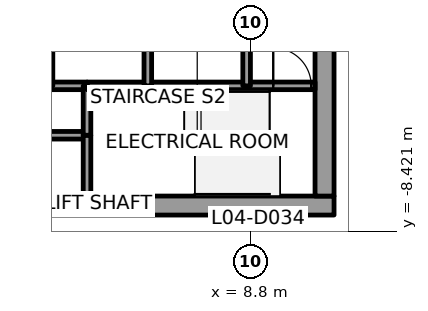
"""IFC4 building model, lengths in metres.
Left out: names, types, materials, properties, quantities, classifications, styles, units other than length and angle.
Written with IfcOpenShell. Run it as: python <this file> out.ifc"""

import sys

from ifc_helpers import new_model, si_unit, direction, frame, frame_2d, origin, place, context, subcontext, project, spatial, rectangle, extrude, element, fill, save


model = new_model("IFC4")
c1 = context("Model", 3, precision=1e-05, world=origin(), true_north=direction((0.0, 1.0)))
c2 = subcontext(c1, "Body", "Model", "MODEL_VIEW")
j1 = project(units=[si_unit("LENGTHUNIT", "METRE"), si_unit("PLANEANGLEUNIT", "RADIAN")], contexts=[c1])
p1 = place(None, origin())
s1 = spatial("IfcSite", under=j1, at=p1, CompositionType="ELEMENT")
p2 = place(p1, origin())
s2 = spatial("IfcBuilding", under=s1, at=p2, CompositionType="ELEMENT")
p3 = place(p2, frame((0.0, 0.0, 28.8)))
s3 = spatial("IfcBuildingStorey", under=s2, at=p3, CompositionType="ELEMENT", Elevation=28.8)
p4 = place(p3, frame((-11.0, -7.75, 0.0), z_axis=(0.0, 0.0, 1.0), x_axis=(1.0, 0.0, 0.0)))
e1 = element("IfcWall", 1, at=p4, inside=s3, PredefinedType="SHEAR", context=c2, shape_type="SweptSolid", body=[
    extrude(rectangle(XDim=22.0, YDim=0.5, at=frame_2d((11.0, 0.0))), origin(), (0.0, 0.0, 1.0), 5.4),
])
p5 = place(p4, frame((10.45, 0.0, 0.0)))
e2 = element("IfcOpeningElement", 2, at=p5, cuts=e1, PredefinedType="OPENING", context=c2, shape_type="SweptSolid", body=[
    extrude(rectangle(XDim=1.1, YDim=2.1, at=frame_2d((0.55, 1.05))), frame((0.0, 0.25, 0.0), z_axis=(0.0, -1.0, 0.0), x_axis=(1.0, 0.0, 0.0)), (0.0, 0.0, 1.0), 0.5),
])
p6 = place(p3, frame((10.75, -7.5, 0.0), z_axis=(0.0, 0.0, 1.0), x_axis=(0.0, 1.0, 0.0)))
e3 = element("IfcWall", 3, at=p6, inside=s3, PredefinedType="SHEAR", context=c2, shape_type="SweptSolid", body=[
    extrude(rectangle(XDim=15.0, YDim=0.5, at=frame_2d((7.5, 0.0))), origin(), (0.0, 0.0, 1.0), 5.4),
])
p7 = place(p6, frame((6.6, 0.0, 0.0)))
e4 = element("IfcOpeningElement", 4, at=p7, cuts=e3, PredefinedType="OPENING", context=c2, shape_type="SweptSolid", body=[
    extrude(rectangle(XDim=1.8, YDim=2.1, at=frame_2d((0.9, 1.05))), frame((0.0, 0.25, 0.0), z_axis=(0.0, -1.0, 0.0), x_axis=(1.0, 0.0, 0.0)), (0.0, 0.0, 1.0), 0.5),
])
p8 = place(p3, frame((4.5, -5.9, 0.0), z_axis=(0.0, 0.0, 1.0), x_axis=(-1.0, 0.0, 0.0)))
e5 = element("IfcWall", 5, at=p8, inside=s3, PredefinedType="SOLIDWALL", context=c2, shape_type="SweptSolid", body=[
    extrude(rectangle(XDim=2.5, YDim=0.2, at=frame_2d((1.25, 0.0))), origin(), (0.0, 0.0, 1.0), 5.0),
])
p9 = place(p3, frame((3.5, -4.6, 0.0), z_axis=(0.0, 0.0, 1.0), x_axis=(1.0, 0.0, 0.0)))
e6 = element("IfcWall", 6, at=p9, inside=s3, PredefinedType="SOLIDWALL", context=c2, shape_type="SweptSolid", body=[
    extrude(rectangle(XDim=1.0, YDim=0.2, at=frame_2d((0.5, 0.0))), origin(), (0.0, 0.0, 1.0), 5.0),
])
p10 = place(p3, frame((4.5, -7.5, 0.0), z_axis=(0.0, 0.0, 1.0), x_axis=(0.0, 1.0, 0.0)))
e7 = element("IfcWall", 7, at=p10, inside=s3, PredefinedType="SOLIDWALL", context=c2, shape_type="SweptSolid", body=[
    extrude(rectangle(XDim=1.6, YDim=0.2, at=frame_2d((0.8, 0.0))), origin(), (0.0, 0.0, 1.0), 5.0),
])
p11 = place(p3, frame((4.5, -5.9, 0.0), z_axis=(0.0, 0.0, 1.0), x_axis=(0.0, 1.0, 0.0)))
e8 = element("IfcWall", 8, at=p11, inside=s3, PredefinedType="SOLIDWALL", context=c2, shape_type="SweptSolid", body=[
    extrude(rectangle(XDim=1.3, YDim=0.2, at=frame_2d((0.65, 0.0))), origin(), (0.0, 0.0, 1.0), 5.0),
])
p12 = place(p3, frame((4.5, -4.6, 0.0), z_axis=(0.0, 0.0, 1.0), x_axis=(1.0, 0.0, 0.0)))
e9 = element("IfcWall", 9, at=p12, inside=s3, PredefinedType="SOLIDWALL", context=c2, shape_type="SweptSolid", body=[
    extrude(rectangle(XDim=1.6, YDim=0.2, at=frame_2d((0.8, 0.0))), origin(), (0.0, 0.0, 1.0), 5.0),
])
p13 = place(p3, frame((6.1, -4.6, 0.0), z_axis=(0.0, 0.0, 1.0), x_axis=(1.0, 0.0, 0.0)))
e10 = element("IfcWall", 10, at=p13, inside=s3, PredefinedType="SOLIDWALL", context=c2, shape_type="SweptSolid", body=[
    extrude(rectangle(XDim=2.6, YDim=0.2, at=frame_2d((1.3, 0.0))), origin(), (0.0, 0.0, 1.0), 5.0),
])
p14 = place(p3, frame((6.1, -4.6, 0.0), z_axis=(0.0, 0.0, 1.0), x_axis=(0.0, 1.0, 0.0)))
e11 = element("IfcWall", 11, at=p14, inside=s3, PredefinedType="SOLIDWALL", context=c2, shape_type="SweptSolid", body=[
    extrude(rectangle(XDim=2.8, YDim=0.2, at=frame_2d((1.4, 0.0))), origin(), (0.0, 0.0, 1.0), 5.0),
])
p15 = place(p3, frame((8.7, -4.6, 0.0), z_axis=(0.0, 0.0, 1.0), x_axis=(1.0, 0.0, 0.0)))
e12 = element("IfcWall", 12, at=p15, inside=s3, PredefinedType="SOLIDWALL", context=c2, shape_type="SweptSolid", body=[
    extrude(rectangle(XDim=1.8, YDim=0.2, at=frame_2d((0.9, 0.0))), origin(), (0.0, 0.0, 1.0), 5.0),
])
p16 = place(p15, frame((0.7, 0.0, 0.0)))
e13 = element("IfcOpeningElement", 13, at=p16, cuts=e12, PredefinedType="OPENING", context=c2, shape_type="SweptSolid", body=[
    extrude(rectangle(XDim=1.0, YDim=2.1, at=frame_2d((0.5, 1.05))), frame((0.0, 0.1, 0.0), z_axis=(0.0, -1.0, 0.0), x_axis=(1.0, 0.0, 0.0)), (0.0, 0.0, 1.0), 0.2),
])
p17 = place(p3, frame((8.7, -4.6, 0.0), z_axis=(0.0, 0.0, 1.0), x_axis=(0.0, 1.0, 0.0)))
e14 = element("IfcWall", 14, at=p17, inside=s3, PredefinedType="SOLIDWALL", context=c2, shape_type="SweptSolid", body=[
    extrude(rectangle(XDim=2.8, YDim=0.2, at=frame_2d((1.4, 0.0))), origin(), (0.0, 0.0, 1.0), 5.0),
])
p18 = place(p16, origin())
e15 = element("IfcDoor", 15, at=p18, inside=s3, OperationType="SINGLE_SWING_RIGHT", PredefinedType="DOOR", context=c2, shape_type="SweptSolid", body=[
    extrude(rectangle(XDim=1.0, YDim=2.1, at=frame_2d((0.5, 1.05))), frame((0.0, 0.025, 0.0), z_axis=(0.0, -1.0, 0.0), x_axis=(1.0, 0.0, 0.0)), (0.0, 0.0, 1.0), 0.05),
])
fill(e13, e15)
save(model, sys.argv[1])
